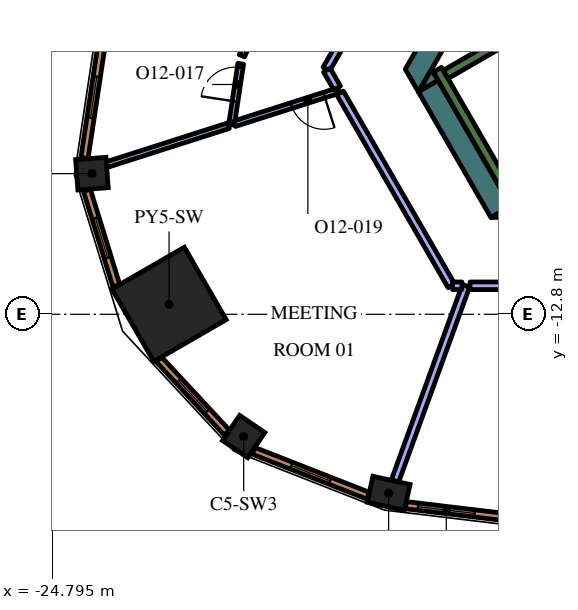
"""IFC4 building model, lengths in metres.
Left out: names, types, materials, properties, quantities, classifications, styles, units other than length and angle.
Written with IfcOpenShell. Run it as: python <this file> out.ifc"""

import sys

from ifc_helpers import new_model, si_unit, direction, frame, frame_2d, origin, origin_2d, place, context, subcontext, project, spatial, polyline, rectangle, outline, extrude, element, fill, save


model = new_model("IFC4")
c1 = context("Model", 3, precision=1e-05, world=origin(), true_north=direction((0.0, 1.0)))
c2 = subcontext(c1, "Body", "Model", "MODEL_VIEW")
j1 = project(units=[si_unit("LENGTHUNIT", "METRE"), si_unit("PLANEANGLEUNIT", "RADIAN")], contexts=[c1])
p1 = place(None, origin())
s1 = spatial("IfcSite", under=j1, at=p1, CompositionType="ELEMENT")
p2 = place(p1, origin())
s2 = spatial("IfcBuilding", under=s1, at=p2, CompositionType="ELEMENT")
p3 = place(p2, frame((0.0, 0.0, 283.8)))
s3 = spatial("IfcBuildingStorey", under=s2, at=p3, CompositionType="ELEMENT", Elevation=283.8)
p4 = place(p3, frame((-21.718, -12.539, 0.0), z_axis=(0.0, 0.0, 1.0), x_axis=(-0.866025403784, -0.5, 0.0)))
e1 = element("IfcColumn", 1, at=p4, inside=s3, PredefinedType="COLUMN", context=c2, shape_type="SweptSolid", body=[
    extrude(rectangle(XDim=2.2, YDim=2.2, at=origin_2d()), origin(), (0.0, 0.0, 1.0), 4.2),
])
p5 = place(p3, frame((-15.941, -17.512, 0.0), z_axis=(0.0, 0.0, 1.0), x_axis=(0.976233636503, -0.216720758026, 0.0)))
e2 = element("IfcColumn", 2, at=p5, inside=s3, PredefinedType="COLUMN", context=c2, shape_type="SweptSolid", body=[
    extrude(rectangle(XDim=1.0, YDim=0.7, at=origin_2d()), origin(), (0.0, 0.0, 1.0), 4.2),
])
for number, where, z_axis, x_axis in (
    (3, (-23.748, -9.1, 0.0), (0.0, 0.0, 1.0), (0.075, -0.997, 0.0)),
    (4, (-19.754, -16.017, 0.0), (0.0, 0.0, 1.0), (0.826, -0.563, 0.0)),
):
    element("IfcColumn", number, at=place(p3, frame(where, z_axis=z_axis, x_axis=x_axis)), inside=s3, PredefinedType="COLUMN", context=c2, shape_type="SweptSolid", body=[
        extrude(rectangle(XDim=0.8, YDim=0.8, at=origin_2d()), origin(), (0.0, 0.0, 1.0), 4.2),
    ])
p6 = place(p3, origin())
e5 = element("IfcWall", 5, at=p6, inside=s3, PredefinedType="SOLIDWALL", context=c2, shape_type="SweptSolid", body=[
    extrude(outline(polyline([(-15.502, -6.35), (-4.912, 11.992), (-4.393, 11.692), (-10.815, 0.569), (-10.84, 0.583), (-10.84, 0.583), (-10.84, 0.583), (-10.965, 0.367), (-10.965, 0.367), (-10.965, 0.367), (-10.94, 0.352), (-11.033, 0.191), (-14.809, -6.35), (-15.156, -6.95), (-15.502, -6.35)])), origin(), (0.0, 0.0, 1.0), 4.2),
])
p7 = place(p3, frame((-14.899, -6.795, 0.0), z_axis=(0.0, 0.0, 1.0), x_axis=(0.499950938802, -0.866053727428, 0.0)))
e6 = element("IfcWall", 6, at=p7, inside=s3, PredefinedType="SOLIDWALL", context=c2, shape_type="SweptSolid", body=[
    extrude(rectangle(XDim=3.823, YDim=0.6, at=frame_2d((1.912, 0.0))), origin(), (0.0, 0.0, 1.0), 4.2),
])
e7 = element("IfcWall", 7, at=p6, inside=s3, PredefinedType="SOLIDWALL", context=c2, shape_type="SweptSolid", body=[
    extrude(outline(polyline([(-14.64, -6.643), (-15.147, -6.936), (-14.809, -6.35), (-14.64, -6.643)])), origin(), (0.0, 0.0, 1.0), 4.2),
])
e8 = element("IfcWall", 8, at=p6, inside=s3, PredefinedType="SOLIDWALL", context=c2, shape_type="SweptSolid", body=[
    extrude(outline(polyline([(-12.557, -10.25), (-13.233, -10.25), (-12.726, -9.957), (-12.557, -10.25)])), origin(), (0.0, 0.0, 1.0), 4.2),
])
p8 = place(p3, frame((-12.84, -9.511, 0.0), z_axis=(0.0, 0.0, 1.0), x_axis=(-0.499997733992, 0.866026712061, 0.0)))
e9 = element("IfcWall", 9, at=p8, inside=s3, PredefinedType="SOLIDWALL", context=c2, shape_type="SweptSolid", body=[
    extrude(rectangle(XDim=3.634, YDim=0.25, at=frame_2d((1.817, 0.0))), origin(), (0.0, 0.0, 1.0), 4.2),
])
p9 = place(p3, frame((-14.44, -6.49, 0.0), z_axis=(0.0, 0.0, 1.0), x_axis=(0.866022966069, 0.500004222222, 0.0)))
e10 = element("IfcWall", 10, at=p9, inside=s3, PredefinedType="SOLIDWALL", context=c2, shape_type="SweptSolid", body=[
    extrude(rectangle(XDim=6.8, YDim=0.25, at=frame_2d((3.4, 0.0))), origin(), (0.0, 0.0, 1.0), 4.2),
])
p10 = place(p3, frame((-15.774, -17.19, 0.0), z_axis=(0.0, 0.0, 1.0), x_axis=(0.341821907823, 0.93976474893, 0.0)))
e11 = element("IfcWall", 11, at=p10, inside=s3, PredefinedType="PARTITIONING", context=c2, shape_type="SweptSolid", body=[
    extrude(rectangle(XDim=5.469, YDim=0.2, at=frame_2d((2.735, 0.0))), origin(), (0.0, 0.0, 1.0), 3.55),
])
p11 = place(p3, frame((-13.799, -12.05, 0.0), z_axis=(0.0, 0.0, 1.0), x_axis=(1.0, 0.0, 0.0)))
e12 = element("IfcWall", 12, at=p11, inside=s3, PredefinedType="PARTITIONING", context=c2, shape_type="SweptSolid", body=[
    extrude(rectangle(XDim=7.303, YDim=0.2, at=frame_2d((3.652, 0.0))), origin(), (0.0, 0.0, 1.0), 3.55),
])
p12 = place(p3, frame((-19.669, -5.69, 0.0), z_axis=(0.0, 0.0, 1.0), x_axis=(-0.393566769146, -0.919296034052, 0.0)))
e13 = element("IfcWall", 13, at=p12, inside=s3, PredefinedType="PARTITIONING", context=c2, shape_type="SweptSolid", body=[
    extrude(rectangle(XDim=0.334, YDim=0.15, at=frame_2d((0.167, 0.0))), origin(), (0.0, 0.0, 1.0), 3.55),
])
p13 = place(p3, frame((-20.074, -7.812, 0.0), z_axis=(0.0, 0.0, 1.0), x_axis=(0.149305499664, 0.988791114326, 0.0)))
e14 = element("IfcWall", 14, at=p13, inside=s3, PredefinedType="PARTITIONING", context=c2, shape_type="SweptSolid", body=[
    extrude(rectangle(XDim=1.62, YDim=0.15, at=frame_2d((0.81, 0.0))), origin(), (0.0, 0.0, 1.0), 3.55),
])
p14 = place(p13, frame((0.621, 0.0, 0.0)))
e15 = element("IfcOpeningElement", 15, at=p14, cuts=e14, PredefinedType="OPENING", context=c2, shape_type="SweptSolid", body=[
    extrude(rectangle(XDim=0.9, YDim=2.1, at=frame_2d((0.45, 1.05))), frame((0.0, 0.085, 0.0), z_axis=(0.0, -1.0, 0.0), x_axis=(1.0, 0.0, 0.0)), (0.0, 0.0, 1.0), 0.17),
])
p15 = place(p3, frame((-20.154, -7.838, 0.0), z_axis=(0.0, 0.0, 1.0), x_axis=(-0.952501497002, -0.304533903217, 0.0)))
e16 = element("IfcWall", 16, at=p15, inside=s3, PredefinedType="PARTITIONING", context=c2, shape_type="SweptSolid", body=[
    extrude(rectangle(XDim=3.37, YDim=0.15, at=frame_2d((1.685, 0.0))), origin(), (0.0, 0.0, 1.0), 3.55),
])
p16 = place(p3, frame((-17.256, -6.911, 0.0), z_axis=(0.0, 0.0, 1.0), x_axis=(-0.95247639241, -0.304612412587, 0.0)))
e17 = element("IfcWall", 17, at=p16, inside=s3, PredefinedType="PARTITIONING", context=c2, shape_type="SweptSolid", body=[
    extrude(rectangle(XDim=2.875, YDim=0.15, at=frame_2d((1.438, 0.0))), origin(), (0.0, 0.0, 1.0), 3.55),
])
p17 = place(p16, frame((0.4, 0.0, 0.0)))
e18 = element("IfcOpeningElement", 18, at=p17, cuts=e17, PredefinedType="OPENING", context=c2, shape_type="SweptSolid", body=[
    extrude(rectangle(XDim=0.9, YDim=2.1, at=frame_2d((0.45, 1.05))), frame((0.0, 0.085, 0.0), z_axis=(0.0, -1.0, 0.0), x_axis=(1.0, 0.0, 0.0)), (0.0, 0.0, 1.0), 0.17),
])
p18 = place(p3, frame((-13.451, 0.803, 0.0), z_axis=(0.0, 0.0, 1.0), x_axis=(-0.499982585408, -0.86603545787, 0.0)))
e19 = element("IfcWall", 19, at=p18, inside=s3, PredefinedType="PARTITIONING", context=c2, shape_type="SweptSolid", body=[
    extrude(rectangle(XDim=8.26, YDim=0.2, at=frame_2d((4.13, 0.0))), origin(), (0.0, 0.0, 1.0), 3.55),
])
p19 = place(p3, frame((-17.565, -6.376, 0.0), z_axis=(0.0, 0.0, 1.0), x_axis=(0.499683376352, -0.866208129376, 0.0)))
e20 = element("IfcWall", 20, at=p19, inside=s3, PredefinedType="PARTITIONING", context=c2, shape_type="SweptSolid", body=[
    extrude(rectangle(XDim=0.541, YDim=0.2, at=frame_2d((0.271, 0.0))), origin(), (0.0, 0.0, 1.0), 3.55),
])
p20 = place(p3, frame((-17.218, -6.978, 0.0), z_axis=(0.0, 0.0, 1.0), x_axis=(0.500012299885, -0.866018302326, 0.0)))
e21 = element("IfcWall", 21, at=p20, inside=s3, PredefinedType="PARTITIONING", context=c2, shape_type="SweptSolid", body=[
    extrude(rectangle(XDim=5.857, YDim=0.2, at=frame_2d((2.929, 0.0))), origin(), (0.0, 0.0, 1.0), 3.55),
])
p21 = place(p3, frame((-14.26, -12.05, 0.0), z_axis=(0.0, 0.0, 1.0), x_axis=(1.0, 0.0, 0.0)))
e22 = element("IfcWall", 22, at=p21, inside=s3, PredefinedType="PARTITIONING", context=c2, shape_type="SweptSolid", body=[
    extrude(rectangle(XDim=0.248, YDim=0.2, at=frame_2d((0.124, 0.0))), origin(), (0.0, 0.0, 1.0), 3.55),
])
p22 = place(p3, frame((-15.487, -17.823, 0.0), z_axis=(0.0, 0.0, 1.0), x_axis=(0.992885582795, -0.119072328769, 0.0)))
e23 = element("IfcWall", 23, at=p22, inside=s3, PredefinedType="SOLIDWALL", context=c2, shape_type="SweptSolid", body=[
    extrude(rectangle(XDim=5.415, YDim=0.19, at=frame_2d((2.708, 0.0))), origin(), (0.0, 0.0, 1.0), 3.95),
])
p23 = place(p22, frame((0.323, 0.0, 0.6)))
e24 = element("IfcOpeningElement", 24, at=p23, cuts=e23, PredefinedType="OPENING", context=c2, shape_type="SweptSolid", body=[
    extrude(rectangle(XDim=1.5, YDim=2.85, at=frame_2d((0.75, 1.425))), frame((0.0, 0.105, 0.0), z_axis=(0.0, -1.0, 0.0), x_axis=(1.0, 0.0, 0.0)), (0.0, 0.0, 1.0), 0.21),
])
p24 = place(p22, frame((3.558, 0.0, 0.6)))
e25 = element("IfcOpeningElement", 25, at=p24, cuts=e23, PredefinedType="OPENING", context=c2, shape_type="SweptSolid", body=[
    extrude(rectangle(XDim=1.5, YDim=2.85, at=frame_2d((0.75, 1.425))), frame((0.0, 0.105, 0.0), z_axis=(0.0, -1.0, 0.0), x_axis=(1.0, 0.0, 0.0)), (0.0, 0.0, 1.0), 0.21),
])
p25 = place(p3, frame((-23.46, -5.488, 0.0), z_axis=(0.0, 0.0, 1.0), x_axis=(-0.149421055602, -0.988773658702, 0.0)))
e26 = element("IfcWall", 26, at=p25, inside=s3, PredefinedType="SOLIDWALL", context=c2, shape_type="SweptSolid", body=[
    extrude(rectangle(XDim=3.237, YDim=0.19, at=frame_2d((1.618, 0.0))), origin(), (0.0, 0.0, 1.0), 3.95),
])
p26 = place(p25, frame((1.068, 0.0, 0.6)))
e27 = element("IfcOpeningElement", 27, at=p26, cuts=e26, PredefinedType="OPENING", context=c2, shape_type="SweptSolid", body=[
    extrude(rectangle(XDim=1.1, YDim=2.85, at=frame_2d((0.55, 1.425))), frame((0.0, 0.105, 0.0), z_axis=(0.0, -1.0, 0.0), x_axis=(1.0, 0.0, 0.0)), (0.0, 0.0, 1.0), 0.21),
])
p27 = place(p3, frame((-23.881, -9.535, 0.0), z_axis=(0.0, 0.0, 1.0), x_axis=(0.294706210429, -0.9555879078, 0.0)))
e28 = element("IfcWall", 28, at=p27, inside=s3, PredefinedType="SOLIDWALL", context=c2, shape_type="SweptSolid", body=[
    extrude(rectangle(XDim=2.627, YDim=0.19, at=frame_2d((1.313, 0.0))), origin(), (0.0, 0.0, 1.0), 3.95),
])
p28 = place(p27, frame((0.763, 0.0, 0.6)))
e29 = element("IfcOpeningElement", 29, at=p28, cuts=e28, PredefinedType="OPENING", context=c2, shape_type="SweptSolid", body=[
    extrude(rectangle(XDim=1.1, YDim=2.85, at=frame_2d((0.55, 1.425))), frame((0.0, 0.105, 0.0), z_axis=(0.0, -1.0, 0.0), x_axis=(1.0, 0.0, 0.0)), (0.0, 0.0, 1.0), 0.21),
])
p29 = place(p3, frame((-21.985, -13.988, 0.0), z_axis=(0.0, 0.0, 1.0), x_axis=(0.680219354823, -0.733008614768, 0.0)))
e30 = element("IfcWall", 30, at=p29, inside=s3, PredefinedType="SOLIDWALL", context=c2, shape_type="SweptSolid", body=[
    extrude(rectangle(XDim=2.627, YDim=0.19, at=frame_2d((1.313, 0.0))), origin(), (0.0, 0.0, 1.0), 3.95),
])
p30 = place(p29, frame((0.763, 0.0, 0.6)))
e31 = element("IfcOpeningElement", 31, at=p30, cuts=e30, PredefinedType="OPENING", context=c2, shape_type="SweptSolid", body=[
    extrude(rectangle(XDim=1.1, YDim=2.85, at=frame_2d((0.55, 1.425))), frame((0.0, 0.105, 0.0), z_axis=(0.0, -1.0, 0.0), x_axis=(1.0, 0.0, 0.0)), (0.0, 0.0, 1.0), 0.21),
])
p31 = place(p3, frame((-19.496, -16.392, 0.0), z_axis=(0.0, 0.0, 1.0), x_axis=(0.93100888477, -0.364996515709, 0.0)))
e32 = element("IfcWall", 32, at=p31, inside=s3, PredefinedType="SOLIDWALL", context=c2, shape_type="SweptSolid", body=[
    extrude(rectangle(XDim=3.237, YDim=0.19, at=frame_2d((1.618, 0.0))), origin(), (0.0, 0.0, 1.0), 3.95),
])
p32 = place(p31, frame((1.068, 0.0, 0.6)))
e33 = element("IfcOpeningElement", 33, at=p32, cuts=e32, PredefinedType="OPENING", context=c2, shape_type="SweptSolid", body=[
    extrude(rectangle(XDim=1.1, YDim=2.85, at=frame_2d((0.55, 1.425))), frame((0.0, 0.105, 0.0), z_axis=(0.0, -1.0, 0.0), x_axis=(1.0, 0.0, 0.0)), (0.0, 0.0, 1.0), 0.21),
])
p33 = place(p14, origin())
e34 = element("IfcDoor", 34, at=p33, inside=s3, OperationType="SINGLE_SWING_RIGHT", PredefinedType="DOOR", context=c2, shape_type="SweptSolid", body=[
    extrude(rectangle(XDim=0.9, YDim=2.1, at=frame_2d((0.45, 1.05))), frame((0.0, 0.025, 0.0), z_axis=(0.0, -1.0, 0.0), x_axis=(1.0, 0.0, 0.0)), (0.0, 0.0, 1.0), 0.05),
])
fill(e15, e34)
p34 = place(p17, origin())
e35 = element("IfcDoor", 35, at=p34, inside=s3, OperationType="SINGLE_SWING_LEFT", PredefinedType="DOOR", context=c2, shape_type="SweptSolid", body=[
    extrude(rectangle(XDim=0.9, YDim=2.1, at=frame_2d((0.45, 1.05))), frame((0.0, 0.025, 0.0), z_axis=(0.0, -1.0, 0.0), x_axis=(1.0, 0.0, 0.0)), (0.0, 0.0, 1.0), 0.05),
])
fill(e18, e35)
p35 = place(p23, origin())
e36 = element("IfcWindow", 36, at=p35, inside=s3, PartitioningType="SINGLE_PANEL", PredefinedType="WINDOW", context=c2, shape_type="SweptSolid", body=[
    extrude(rectangle(XDim=1.5, YDim=2.85, at=frame_2d((0.75, 1.425))), frame((0.0, 0.045, 0.0), z_axis=(0.0, -1.0, 0.0), x_axis=(1.0, 0.0, 0.0)), (0.0, 0.0, 1.0), 0.06),
])
fill(e24, e36)
p36 = place(p26, origin())
e37 = element("IfcWindow", 37, at=p36, inside=s3, PartitioningType="SINGLE_PANEL", PredefinedType="WINDOW", context=c2, shape_type="SweptSolid", body=[
    extrude(rectangle(XDim=1.1, YDim=2.85, at=frame_2d((0.55, 1.425))), frame((0.0, 0.045, 0.0), z_axis=(0.0, -1.0, 0.0), x_axis=(1.0, 0.0, 0.0)), (0.0, 0.0, 1.0), 0.06),
])
fill(e27, e37)
p37 = place(p28, origin())
e38 = element("IfcWindow", 38, at=p37, inside=s3, PartitioningType="SINGLE_PANEL", PredefinedType="WINDOW", context=c2, shape_type="SweptSolid", body=[
    extrude(rectangle(XDim=1.1, YDim=2.85, at=frame_2d((0.55, 1.425))), frame((0.0, 0.045, 0.0), z_axis=(0.0, -1.0, 0.0), x_axis=(1.0, 0.0, 0.0)), (0.0, 0.0, 1.0), 0.06),
])
fill(e29, e38)
p38 = place(p30, origin())
e39 = element("IfcWindow", 39, at=p38, inside=s3, PartitioningType="SINGLE_PANEL", PredefinedType="WINDOW", context=c2, shape_type="SweptSolid", body=[
    extrude(rectangle(XDim=1.1, YDim=2.85, at=frame_2d((0.55, 1.425))), frame((0.0, 0.045, 0.0), z_axis=(0.0, -1.0, 0.0), x_axis=(1.0, 0.0, 0.0)), (0.0, 0.0, 1.0), 0.06),
])
fill(e31, e39)
p39 = place(p32, origin())
e40 = element("IfcWindow", 40, at=p39, inside=s3, PartitioningType="SINGLE_PANEL", PredefinedType="WINDOW", context=c2, shape_type="SweptSolid", body=[
    extrude(rectangle(XDim=1.1, YDim=2.85, at=frame_2d((0.55, 1.425))), frame((0.0, 0.045, 0.0), z_axis=(0.0, -1.0, 0.0), x_axis=(1.0, 0.0, 0.0)), (0.0, 0.0, 1.0), 0.06),
])
fill(e33, e40)
save(model, sys.argv[1])
